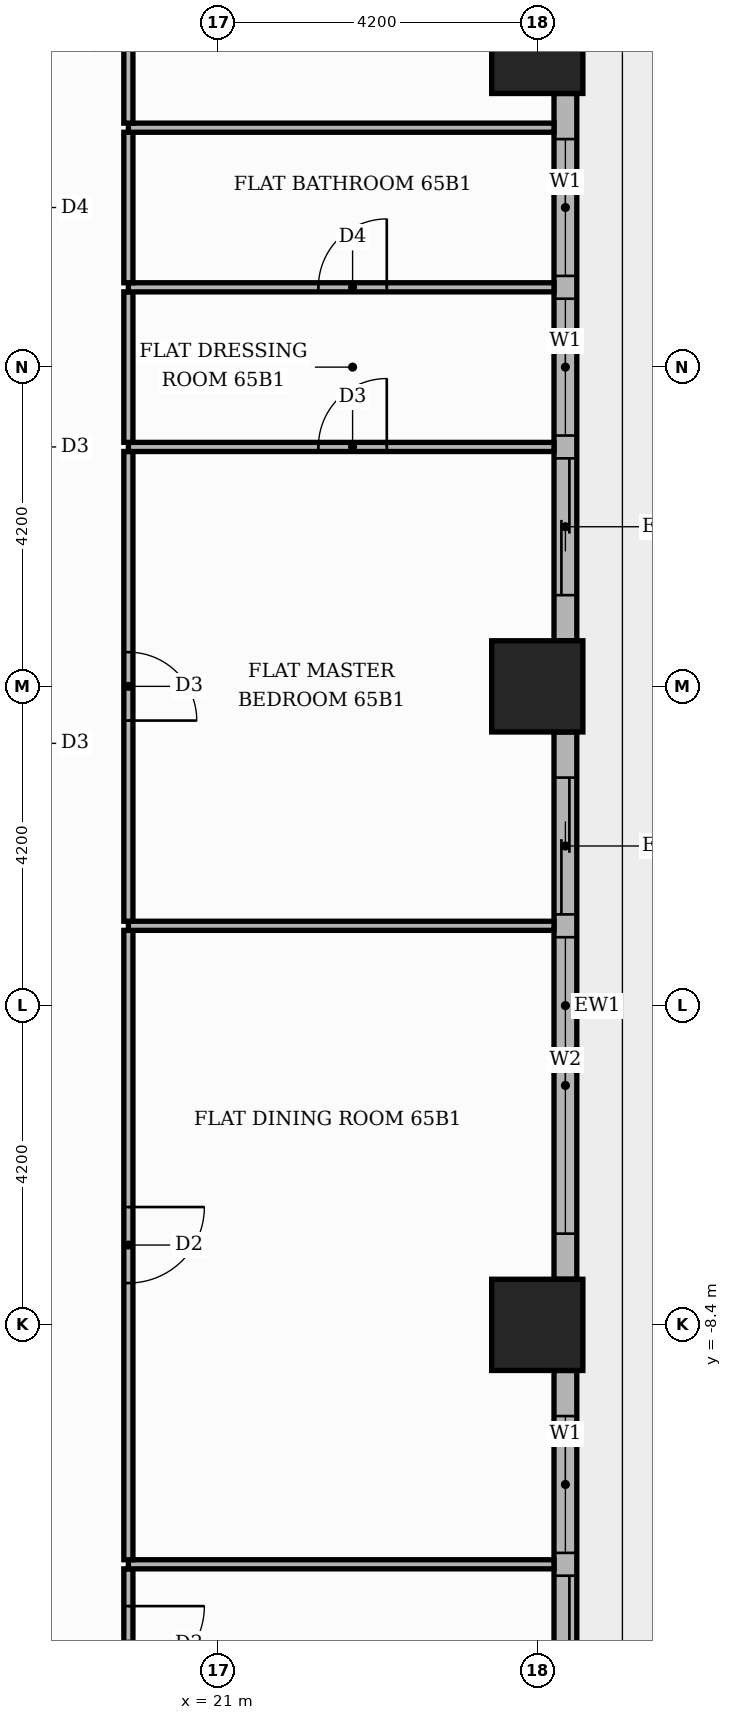
"""IFC4 building model, lengths in metres.
Left out: names, types, materials, properties, quantities, classifications, styles, units other than length and angle.
Written with IfcOpenShell. Run it as: python <this file> out.ifc"""

import sys

from ifc_helpers import new_model, si_unit, direction, frame, frame_2d, origin, origin_2d, place, context, subcontext, project, spatial, rectangle, extrude, element, fill, save


model = new_model("IFC4")
c1 = context("Model", 3, precision=1e-05, world=origin(), true_north=direction((0.0, 1.0)))
c2 = subcontext(c1, "Body", "Model", "MODEL_VIEW")
j1 = project(units=[si_unit("LENGTHUNIT", "METRE"), si_unit("PLANEANGLEUNIT", "RADIAN")], contexts=[c1])
p1 = place(None, origin())
s1 = spatial("IfcSite", under=j1, at=p1, CompositionType="ELEMENT")
p2 = place(p1, origin())
s2 = spatial("IfcBuilding", under=s1, at=p2, CompositionType="ELEMENT")
p3 = place(p2, frame((0.0, 0.0, 271.8)))
s3 = spatial("IfcBuildingStorey", under=s2, at=p3, CompositionType="ELEMENT", Elevation=271.8)
for number, where, z_axis, x_axis in (
    (1, (25.2, 0.0, 0.0), (0.0, 0.0, 1.0), (1.0, 0.0, 0.0)),
    (2, (25.2, 8.4, 0.0), (0.0, 0.0, 1.0), (1.0, 0.0, 0.0)),
    (3, (25.2, -8.4, 0.0), (0.0, 0.0, 1.0), (1.0, 0.0, 0.0)),
):
    element("IfcColumn", number, at=place(p3, frame(where, z_axis=z_axis, x_axis=x_axis)), inside=s3, PredefinedType="COLUMN", context=c2, shape_type="SweptSolid", body=[
        extrude(rectangle(XDim=1.2, YDim=1.2, at=origin_2d()), origin(), (0.0, 0.0, 1.0), 3.9),
    ])
p4 = place(p3, frame((25.57, -16.2, 0.0), z_axis=(0.0, 0.0, 1.0), x_axis=(0.0, 1.0, 0.0)))
e4 = element("IfcWall", 4, at=p4, inside=s3, PredefinedType="STANDARD", context=c2, shape_type="SweptSolid", body=[
    extrude(rectangle(XDim=7.2, YDim=0.3, at=frame_2d((3.6, 0.0))), origin(), (0.0, 0.0, 1.0), 3.48),
])
p5 = place(p4, frame((0.6, 0.0, 0.0)))
e5 = element("IfcOpeningElement", 5, at=p5, cuts=e4, PredefinedType="OPENING", context=c2, shape_type="SweptSolid", body=[
    extrude(rectangle(XDim=3.9, YDim=2.4, at=frame_2d((1.95, 1.2))), frame((0.0, 0.16, 0.0), z_axis=(0.0, -1.0, 0.0), x_axis=(1.0, 0.0, 0.0)), (0.0, 0.0, 1.0), 0.32),
])
p6 = place(p4, frame((4.8, 0.0, 0.9)))
e6 = element("IfcOpeningElement", 6, at=p6, cuts=e4, PredefinedType="OPENING", context=c2, shape_type="SweptSolid", body=[
    extrude(rectangle(XDim=1.8, YDim=2.1, at=frame_2d((0.9, 1.05))), frame((0.0, 0.16, 0.0), z_axis=(0.0, -1.0, 0.0), x_axis=(1.0, 0.0, 0.0)), (0.0, 0.0, 1.0), 0.32),
])
p7 = place(p3, frame((25.57, -7.8, 0.0), z_axis=(0.0, 0.0, 1.0), x_axis=(0.0, 1.0, 0.0)))
e7 = element("IfcWall", 7, at=p7, inside=s3, PredefinedType="STANDARD", context=c2, shape_type="SweptSolid", body=[
    extrude(rectangle(XDim=7.2, YDim=0.3, at=frame_2d((3.6, 0.0))), origin(), (0.0, 0.0, 1.0), 3.48),
])
p8 = place(p7, frame((0.6, 0.0, 0.9)))
e8 = element("IfcOpeningElement", 8, at=p8, cuts=e7, PredefinedType="OPENING", context=c2, shape_type="SweptSolid", body=[
    extrude(rectangle(XDim=3.9, YDim=2.1, at=frame_2d((1.95, 1.05))), frame((0.0, 0.16, 0.0), z_axis=(0.0, -1.0, 0.0), x_axis=(1.0, 0.0, 0.0)), (0.0, 0.0, 1.0), 0.32),
])
p9 = place(p7, frame((4.8, 0.0, 0.0)))
e9 = element("IfcOpeningElement", 9, at=p9, cuts=e7, PredefinedType="OPENING", context=c2, shape_type="SweptSolid", body=[
    extrude(rectangle(XDim=1.8, YDim=2.4, at=frame_2d((0.9, 1.2))), frame((0.0, 0.16, 0.0), z_axis=(0.0, -1.0, 0.0), x_axis=(1.0, 0.0, 0.0)), (0.0, 0.0, 1.0), 0.32),
])
p10 = place(p3, frame((25.57, 0.6, 0.0), z_axis=(0.0, 0.0, 1.0), x_axis=(0.0, 1.0, 0.0)))
e10 = element("IfcWall", 10, at=p10, inside=s3, PredefinedType="STANDARD", context=c2, shape_type="SweptSolid", body=[
    extrude(rectangle(XDim=7.2, YDim=0.3, at=frame_2d((3.6, 0.0))), origin(), (0.0, 0.0, 1.0), 3.48),
])
p11 = place(p10, frame((0.6, 0.0, 0.0)))
e11 = element("IfcOpeningElement", 11, at=p11, cuts=e10, PredefinedType="OPENING", context=c2, shape_type="SweptSolid", body=[
    extrude(rectangle(XDim=1.8, YDim=2.4, at=frame_2d((0.9, 1.2))), frame((0.0, 0.16, 0.0), z_axis=(0.0, -1.0, 0.0), x_axis=(1.0, 0.0, 0.0)), (0.0, 0.0, 1.0), 0.32),
])
p12 = place(p10, frame((2.7, 0.0, 0.9)))
e12 = element("IfcOpeningElement", 12, at=p12, cuts=e10, PredefinedType="OPENING", context=c2, shape_type="SweptSolid", body=[
    extrude(rectangle(XDim=1.8, YDim=2.1, at=frame_2d((0.9, 1.05))), frame((0.0, 0.16, 0.0), z_axis=(0.0, -1.0, 0.0), x_axis=(1.0, 0.0, 0.0)), (0.0, 0.0, 1.0), 0.32),
])
p13 = place(p10, frame((4.8, 0.0, 0.9)))
e13 = element("IfcOpeningElement", 13, at=p13, cuts=e10, PredefinedType="OPENING", context=c2, shape_type="SweptSolid", body=[
    extrude(rectangle(XDim=1.8, YDim=2.1, at=frame_2d((0.9, 1.05))), frame((0.0, 0.16, 0.0), z_axis=(0.0, -1.0, 0.0), x_axis=(1.0, 0.0, 0.0)), (0.0, 0.0, 1.0), 0.32),
])
p14 = place(p3, frame((19.82, -13.59, 0.0), z_axis=(0.0, 0.0, 1.0), x_axis=(0.0, 1.0, 0.0)))
e14 = element("IfcWall", 14, at=p14, inside=s3, PredefinedType="PARTITIONING", context=c2, shape_type="SweptSolid", body=[
    extrude(rectangle(XDim=1.98, YDim=0.12, at=frame_2d((0.99, 0.0))), origin(), (0.0, 0.0, 1.0), 3.48),
])
p15 = place(p14, frame((0.49, 0.0, 0.0)))
e15 = element("IfcOpeningElement", 15, at=p15, cuts=e14, PredefinedType="OPENING", context=c2, shape_type="SweptSolid", body=[
    extrude(rectangle(XDim=1.0, YDim=2.1, at=frame_2d((0.5, 1.05))), frame((0.0, 0.07, 0.0), z_axis=(0.0, -1.0, 0.0), x_axis=(1.0, 0.0, 0.0)), (0.0, 0.0, 1.0), 0.14),
])
p16 = place(p3, frame((19.82, -11.55, 0.0), z_axis=(0.0, 0.0, 1.0), x_axis=(1.0, 0.0, 0.0)))
e16 = element("IfcWall", 16, at=p16, inside=s3, PredefinedType="PARTITIONING", context=c2, shape_type="SweptSolid", body=[
    extrude(rectangle(XDim=5.6, YDim=0.12, at=frame_2d((2.8, 0.0))), origin(), (0.0, 0.0, 1.0), 3.48),
])
p17 = place(p3, frame((19.82, -11.49, 0.0), z_axis=(0.0, 0.0, 1.0), x_axis=(0.0, 1.0, 0.0)))
e17 = element("IfcWall", 17, at=p17, inside=s3, PredefinedType="PARTITIONING", context=c2, shape_type="SweptSolid", body=[
    extrude(rectangle(XDim=8.28, YDim=0.12, at=frame_2d((4.14, 0.0))), origin(), (0.0, 0.0, 1.0), 3.48),
])
p18 = place(p17, frame((3.64, 0.0, 0.0)))
e18 = element("IfcOpeningElement", 18, at=p18, cuts=e17, PredefinedType="OPENING", context=c2, shape_type="SweptSolid", body=[
    extrude(rectangle(XDim=1.0, YDim=2.1, at=frame_2d((0.5, 1.05))), frame((0.0, 0.07, 0.0), z_axis=(0.0, -1.0, 0.0), x_axis=(1.0, 0.0, 0.0)), (0.0, 0.0, 1.0), 0.14),
])
p19 = place(p3, frame((19.82, -3.15, 0.0), z_axis=(0.0, 0.0, 1.0), x_axis=(1.0, 0.0, 0.0)))
e19 = element("IfcWall", 19, at=p19, inside=s3, PredefinedType="PARTITIONING", context=c2, shape_type="SweptSolid", body=[
    extrude(rectangle(XDim=5.6, YDim=0.12, at=frame_2d((2.8, 0.0))), origin(), (0.0, 0.0, 1.0), 3.48),
])
p20 = place(p3, frame((19.82, -3.09, 0.0), z_axis=(0.0, 0.0, 1.0), x_axis=(0.0, 1.0, 0.0)))
e20 = element("IfcWall", 20, at=p20, inside=s3, PredefinedType="PARTITIONING", context=c2, shape_type="SweptSolid", body=[
    extrude(rectangle(XDim=6.18, YDim=0.12, at=frame_2d((3.09, 0.0))), origin(), (0.0, 0.0, 1.0), 3.48),
])
p21 = place(p20, frame((2.64, 0.0, 0.0)))
e21 = element("IfcOpeningElement", 21, at=p21, cuts=e20, PredefinedType="OPENING", context=c2, shape_type="SweptSolid", body=[
    extrude(rectangle(XDim=0.9, YDim=2.1, at=frame_2d((0.45, 1.05))), frame((0.0, 0.07, 0.0), z_axis=(0.0, -1.0, 0.0), x_axis=(1.0, 0.0, 0.0)), (0.0, 0.0, 1.0), 0.14),
])
p22 = place(p3, frame((19.82, 3.15, 0.0), z_axis=(0.0, 0.0, 1.0), x_axis=(1.0, 0.0, 0.0)))
e22 = element("IfcWall", 22, at=p22, inside=s3, PredefinedType="PARTITIONING", context=c2, shape_type="SweptSolid", body=[
    extrude(rectangle(XDim=5.6, YDim=0.12, at=frame_2d((2.8, 0.0))), origin(), (0.0, 0.0, 1.0), 3.48),
])
p23 = place(p22, frame((2.5, 0.0, 0.0)))
e23 = element("IfcOpeningElement", 23, at=p23, cuts=e22, PredefinedType="OPENING", context=c2, shape_type="SweptSolid", body=[
    extrude(rectangle(XDim=0.9, YDim=2.1, at=frame_2d((0.45, 1.05))), frame((0.0, 0.07, 0.0), z_axis=(0.0, -1.0, 0.0), x_axis=(1.0, 0.0, 0.0)), (0.0, 0.0, 1.0), 0.14),
])
p24 = place(p3, frame((19.82, 3.21, 0.0), z_axis=(0.0, 0.0, 1.0), x_axis=(0.0, 1.0, 0.0)))
e24 = element("IfcWall", 24, at=p24, inside=s3, PredefinedType="PARTITIONING", context=c2, shape_type="SweptSolid", body=[
    extrude(rectangle(XDim=1.98, YDim=0.12, at=frame_2d((0.99, 0.0))), origin(), (0.0, 0.0, 1.0), 3.48),
])
p25 = place(p3, frame((19.82, 5.25, 0.0), z_axis=(0.0, 0.0, 1.0), x_axis=(1.0, 0.0, 0.0)))
e25 = element("IfcWall", 25, at=p25, inside=s3, PredefinedType="PARTITIONING", context=c2, shape_type="SweptSolid", body=[
    extrude(rectangle(XDim=5.6, YDim=0.12, at=frame_2d((2.8, 0.0))), origin(), (0.0, 0.0, 1.0), 3.48),
])
p26 = place(p25, frame((2.5, 0.0, 0.0)))
e26 = element("IfcOpeningElement", 26, at=p26, cuts=e25, PredefinedType="OPENING", context=c2, shape_type="SweptSolid", body=[
    extrude(rectangle(XDim=0.9, YDim=2.1, at=frame_2d((0.45, 1.05))), frame((0.0, 0.07, 0.0), z_axis=(0.0, -1.0, 0.0), x_axis=(1.0, 0.0, 0.0)), (0.0, 0.0, 1.0), 0.14),
])
p27 = place(p3, frame((19.82, 5.31, 0.0), z_axis=(0.0, 0.0, 1.0), x_axis=(0.0, 1.0, 0.0)))
e27 = element("IfcWall", 27, at=p27, inside=s3, PredefinedType="PARTITIONING", context=c2, shape_type="SweptSolid", body=[
    extrude(rectangle(XDim=1.98, YDim=0.12, at=frame_2d((0.99, 0.0))), origin(), (0.0, 0.0, 1.0), 3.48),
])
p28 = place(p3, frame((19.82, 7.35, 0.0), z_axis=(0.0, 0.0, 1.0), x_axis=(1.0, 0.0, 0.0)))
e28 = element("IfcWall", 28, at=p28, inside=s3, PredefinedType="PARTITIONING", context=c2, shape_type="SweptSolid", body=[
    extrude(rectangle(XDim=5.6, YDim=0.12, at=frame_2d((2.8, 0.0))), origin(), (0.0, 0.0, 1.0), 3.48),
])
p29 = place(p3, frame((19.82, 7.41, 0.0), z_axis=(0.0, 0.0, 1.0), x_axis=(0.0, 1.0, 0.0)))
e29 = element("IfcWall", 29, at=p29, inside=s3, PredefinedType="PARTITIONING", context=c2, shape_type="SweptSolid", body=[
    extrude(rectangle(XDim=4.08, YDim=0.12, at=frame_2d((2.04, 0.0))), origin(), (0.0, 0.0, 1.0), 3.48),
])
p30 = place(p29, frame((1.59, 0.0, 0.0)))
e30 = element("IfcOpeningElement", 30, at=p30, cuts=e29, PredefinedType="OPENING", context=c2, shape_type="SweptSolid", body=[
    extrude(rectangle(XDim=0.9, YDim=2.1, at=frame_2d((0.45, 1.05))), frame((0.0, 0.07, 0.0), z_axis=(0.0, -1.0, 0.0), x_axis=(1.0, 0.0, 0.0)), (0.0, 0.0, 1.0), 0.14),
])
p31 = place(p5, origin())
e31 = element("IfcDoor", 31, at=p31, inside=s3, OperationType="SLIDING_TO_LEFT", PredefinedType="DOOR", context=c2, shape_type="SweptSolid", body=[
    extrude(rectangle(XDim=3.9, YDim=2.4, at=frame_2d((1.95, 1.2))), frame((0.0, 0.025, 0.0), z_axis=(0.0, -1.0, 0.0), x_axis=(1.0, 0.0, 0.0)), (0.0, 0.0, 1.0), 0.05),
])
fill(e5, e31)
p32 = place(p6, origin())
e32 = element("IfcWindow", 32, at=p32, inside=s3, PartitioningType="SINGLE_PANEL", PredefinedType="WINDOW", context=c2, shape_type="SweptSolid", body=[
    extrude(rectangle(XDim=1.8, YDim=2.1, at=frame_2d((0.9, 1.05))), frame((0.0, 0.03, 0.0), z_axis=(0.0, -1.0, 0.0), x_axis=(1.0, 0.0, 0.0)), (0.0, 0.0, 1.0), 0.06),
])
fill(e6, e32)
p33 = place(p8, origin())
e33 = element("IfcWindow", 33, at=p33, inside=s3, PartitioningType="SINGLE_PANEL", PredefinedType="WINDOW", context=c2, shape_type="SweptSolid", body=[
    extrude(rectangle(XDim=3.9, YDim=2.1, at=frame_2d((1.95, 1.05))), frame((0.0, 0.03, 0.0), z_axis=(0.0, -1.0, 0.0), x_axis=(1.0, 0.0, 0.0)), (0.0, 0.0, 1.0), 0.06),
])
fill(e8, e33)
p34 = place(p9, origin())
e34 = element("IfcDoor", 34, at=p34, inside=s3, OperationType="SLIDING_TO_RIGHT", PredefinedType="DOOR", context=c2, shape_type="SweptSolid", body=[
    extrude(rectangle(XDim=1.8, YDim=2.4, at=frame_2d((0.9, 1.2))), frame((0.0, 0.025, 0.0), z_axis=(0.0, -1.0, 0.0), x_axis=(1.0, 0.0, 0.0)), (0.0, 0.0, 1.0), 0.05),
])
fill(e9, e34)
p35 = place(p11, origin())
e35 = element("IfcDoor", 35, at=p35, inside=s3, OperationType="SLIDING_TO_LEFT", PredefinedType="DOOR", context=c2, shape_type="SweptSolid", body=[
    extrude(rectangle(XDim=1.8, YDim=2.4, at=frame_2d((0.9, 1.2))), frame((0.0, 0.025, 0.0), z_axis=(0.0, -1.0, 0.0), x_axis=(1.0, 0.0, 0.0)), (0.0, 0.0, 1.0), 0.05),
])
fill(e11, e35)
p36 = place(p12, origin())
e36 = element("IfcWindow", 36, at=p36, inside=s3, PartitioningType="SINGLE_PANEL", PredefinedType="WINDOW", context=c2, shape_type="SweptSolid", body=[
    extrude(rectangle(XDim=1.8, YDim=2.1, at=frame_2d((0.9, 1.05))), frame((0.0, 0.03, 0.0), z_axis=(0.0, -1.0, 0.0), x_axis=(1.0, 0.0, 0.0)), (0.0, 0.0, 1.0), 0.06),
])
fill(e12, e36)
p37 = place(p13, origin())
e37 = element("IfcWindow", 37, at=p37, inside=s3, PartitioningType="SINGLE_PANEL", PredefinedType="WINDOW", context=c2, shape_type="SweptSolid", body=[
    extrude(rectangle(XDim=1.8, YDim=2.1, at=frame_2d((0.9, 1.05))), frame((0.0, 0.03, 0.0), z_axis=(0.0, -1.0, 0.0), x_axis=(1.0, 0.0, 0.0)), (0.0, 0.0, 1.0), 0.06),
])
fill(e13, e37)
p38 = place(p15, frame((1.0, 0.0, 0.0), z_axis=(0.0, 0.0, 1.0), x_axis=(-1.0, 0.0, 0.0)))
e38 = element("IfcDoor", 38, at=p38, inside=s3, OperationType="SINGLE_SWING_RIGHT", PredefinedType="DOOR", context=c2, shape_type="SweptSolid", body=[
    extrude(rectangle(XDim=1.0, YDim=2.1, at=frame_2d((0.5, 1.05))), frame((0.0, 0.025, 0.0), z_axis=(0.0, -1.0, 0.0), x_axis=(1.0, 0.0, 0.0)), (0.0, 0.0, 1.0), 0.05),
])
fill(e15, e38)
p39 = place(p18, frame((1.0, 0.0, 0.0), z_axis=(0.0, 0.0, 1.0), x_axis=(-1.0, 0.0, 0.0)))
e39 = element("IfcDoor", 39, at=p39, inside=s3, OperationType="SINGLE_SWING_RIGHT", PredefinedType="DOOR", context=c2, shape_type="SweptSolid", body=[
    extrude(rectangle(XDim=1.0, YDim=2.1, at=frame_2d((0.5, 1.05))), frame((0.0, 0.025, 0.0), z_axis=(0.0, -1.0, 0.0), x_axis=(1.0, 0.0, 0.0)), (0.0, 0.0, 1.0), 0.05),
])
fill(e18, e39)
p40 = place(p21, frame((0.9, 0.0, 0.0), z_axis=(0.0, 0.0, 1.0), x_axis=(-1.0, 0.0, 0.0)))
e40 = element("IfcDoor", 40, at=p40, inside=s3, OperationType="SINGLE_SWING_LEFT", PredefinedType="DOOR", context=c2, shape_type="SweptSolid", body=[
    extrude(rectangle(XDim=0.9, YDim=2.1, at=frame_2d((0.45, 1.05))), frame((0.0, 0.025, 0.0), z_axis=(0.0, -1.0, 0.0), x_axis=(1.0, 0.0, 0.0)), (0.0, 0.0, 1.0), 0.05),
])
fill(e21, e40)
p41 = place(p23, origin())
e41 = element("IfcDoor", 41, at=p41, inside=s3, OperationType="SINGLE_SWING_RIGHT", PredefinedType="DOOR", context=c2, shape_type="SweptSolid", body=[
    extrude(rectangle(XDim=0.9, YDim=2.1, at=frame_2d((0.45, 1.05))), frame((0.0, 0.025, 0.0), z_axis=(0.0, -1.0, 0.0), x_axis=(1.0, 0.0, 0.0)), (0.0, 0.0, 1.0), 0.05),
])
fill(e23, e41)
p42 = place(p26, origin())
e42 = element("IfcDoor", 42, at=p42, inside=s3, OperationType="SINGLE_SWING_RIGHT", PredefinedType="DOOR", context=c2, shape_type="SweptSolid", body=[
    extrude(rectangle(XDim=0.9, YDim=2.1, at=frame_2d((0.45, 1.05))), frame((0.0, 0.025, 0.0), z_axis=(0.0, -1.0, 0.0), x_axis=(1.0, 0.0, 0.0)), (0.0, 0.0, 1.0), 0.05),
])
fill(e26, e42)
save(model, sys.argv[1])
